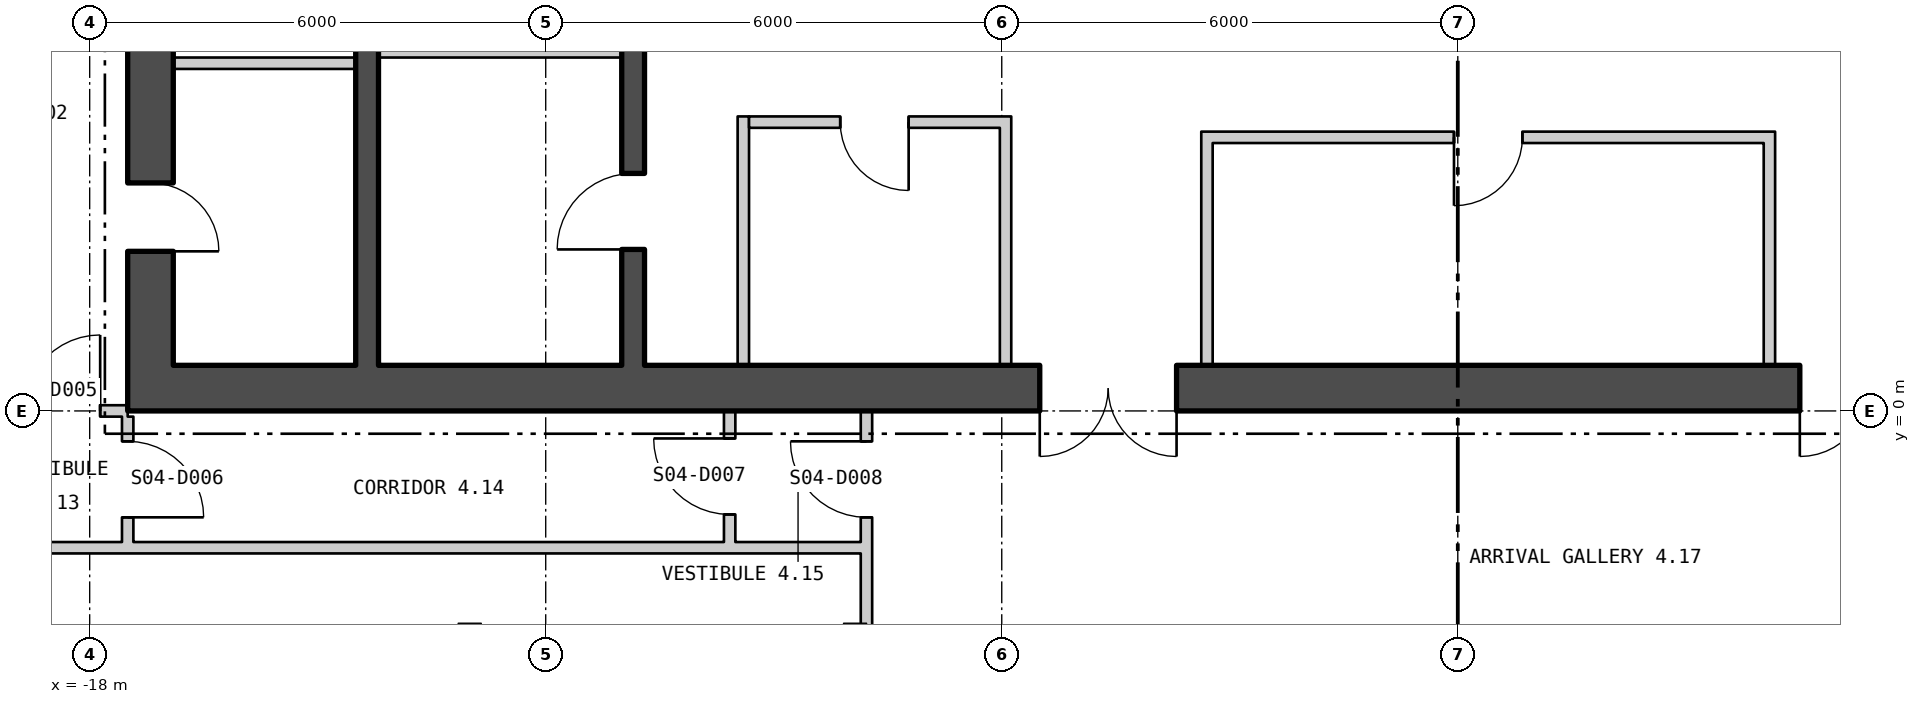
"""IFC4 building model, lengths in metres.
Left out: names, types, materials, properties, quantities, classifications, styles, units other than length and angle.
Written with IfcOpenShell. Run it as: python <this file> out.ifc"""

import sys

from ifc_helpers import new_model, si_unit, direction, frame, frame_2d, origin, origin_2d, place, context, subcontext, project, spatial, polyline, rectangle, i_section, outline, extrude, element, fill, save


model = new_model("IFC4")
c1 = context("Model", 3, precision=1e-05, world=origin(), true_north=direction((0.0, 1.0)))
c2 = subcontext(c1, "Body", "Model", "MODEL_VIEW")
j1 = project(units=[si_unit("LENGTHUNIT", "METRE"), si_unit("PLANEANGLEUNIT", "RADIAN")], contexts=[c1])
p1 = place(None, origin())
s1 = spatial("IfcSite", under=j1, at=p1, CompositionType="ELEMENT")
p2 = place(p1, origin())
s2 = spatial("IfcBuilding", under=s1, at=p2, CompositionType="ELEMENT")
p3 = place(p2, frame((0.0, 0.0, 60.3)))
s3 = spatial("IfcBuildingStorey", under=s2, at=p3, CompositionType="ELEMENT", Elevation=60.3)
for number, where, z_axis, x_axis in (
    (1, (-7.93, -3.2, 0.0), (0.0, 0.0, 1.0), (1.0, 0.0, 0.0)),
    (2, (-13.0, -3.2, 0.0), (0.0, 0.0, 1.0), (1.0, 0.0, 0.0)),
):
    element("IfcColumn", number, at=place(p3, frame(where, z_axis=z_axis, x_axis=x_axis)), inside=s3, PredefinedType="COLUMN", context=c2, shape_type="SweptSolid", body=[
        extrude(i_section(OverallWidth=0.303, OverallDepth=0.814, WebThickness=0.021, FlangeThickness=0.04, at=origin_2d()), origin(), (0.0, 0.0, 1.0), 4.5),
    ])
p4 = place(p3, frame((-28.3, 10.579, -0.18), z_axis=(0.0, 0.0, 1.0), x_axis=(0.499999388847, -0.866025756634, 0.0)))
e3 = element("IfcWall", 3, at=p4, inside=s3, PredefinedType="SOLIDWALL", context=c2, shape_type="SweptSolid", body=[
    extrude(outline(polyline([(-0.13, -0.225), (45.88, -0.225), (45.62, 0.225), (0.13, 0.225), (-0.13, -0.225)])), origin(), (0.0, 0.0, 1.0), 4.28),
])
p5 = place(p4, frame((1.425, 0.0, 1.08)))
e4 = element("IfcOpeningElement", 4, at=p5, cuts=e3, PredefinedType="OPENING", context=c2, shape_type="SweptSolid", body=[
    extrude(rectangle(XDim=2.4, YDim=2.6, at=frame_2d((1.2, 1.3))), frame((0.0, 0.235, 0.0), z_axis=(0.0, -1.0, 0.0), x_axis=(1.0, 0.0, 0.0)), (0.0, 0.0, 1.0), 0.47),
])
p6 = place(p4, frame((5.895, 0.0, 1.08)))
e5 = element("IfcOpeningElement", 5, at=p6, cuts=e3, PredefinedType="OPENING", context=c2, shape_type="SweptSolid", body=[
    extrude(rectangle(XDim=2.4, YDim=2.6, at=frame_2d((1.2, 1.3))), frame((0.0, 0.235, 0.0), z_axis=(0.0, -1.0, 0.0), x_axis=(1.0, 0.0, 0.0)), (0.0, 0.0, 1.0), 0.47),
])
p7 = place(p4, frame((10.403, 0.0, 1.08)))
e6 = element("IfcOpeningElement", 6, at=p7, cuts=e3, PredefinedType="OPENING", context=c2, shape_type="SweptSolid", body=[
    extrude(rectangle(XDim=2.4, YDim=2.6, at=frame_2d((1.2, 1.3))), frame((0.0, 0.235, 0.0), z_axis=(0.0, -1.0, 0.0), x_axis=(1.0, 0.0, 0.0)), (0.0, 0.0, 1.0), 0.47),
])
p8 = place(p4, frame((14.912, 0.0, 1.08)))
e7 = element("IfcOpeningElement", 7, at=p8, cuts=e3, PredefinedType="OPENING", context=c2, shape_type="SweptSolid", body=[
    extrude(rectangle(XDim=2.4, YDim=2.6, at=frame_2d((1.2, 1.3))), frame((0.0, 0.235, 0.0), z_axis=(0.0, -1.0, 0.0), x_axis=(1.0, 0.0, 0.0)), (0.0, 0.0, 1.0), 0.47),
])
p9 = place(p4, frame((19.421, 0.0, 1.08)))
e8 = element("IfcOpeningElement", 8, at=p9, cuts=e3, PredefinedType="OPENING", context=c2, shape_type="SweptSolid", body=[
    extrude(rectangle(XDim=2.4, YDim=2.6, at=frame_2d((1.2, 1.3))), frame((0.0, 0.235, 0.0), z_axis=(0.0, -1.0, 0.0), x_axis=(1.0, 0.0, 0.0)), (0.0, 0.0, 1.0), 0.47),
])
p10 = place(p4, frame((23.929, 0.0, 1.08)))
e9 = element("IfcOpeningElement", 9, at=p10, cuts=e3, PredefinedType="OPENING", context=c2, shape_type="SweptSolid", body=[
    extrude(rectangle(XDim=2.4, YDim=2.6, at=frame_2d((1.2, 1.3))), frame((0.0, 0.235, 0.0), z_axis=(0.0, -1.0, 0.0), x_axis=(1.0, 0.0, 0.0)), (0.0, 0.0, 1.0), 0.47),
])
p11 = place(p4, frame((28.438, 0.0, 1.08)))
e10 = element("IfcOpeningElement", 10, at=p11, cuts=e3, PredefinedType="OPENING", context=c2, shape_type="SweptSolid", body=[
    extrude(rectangle(XDim=2.4, YDim=2.6, at=frame_2d((1.2, 1.3))), frame((0.0, 0.235, 0.0), z_axis=(0.0, -1.0, 0.0), x_axis=(1.0, 0.0, 0.0)), (0.0, 0.0, 1.0), 0.47),
])
p12 = place(p4, frame((32.947, 0.0, 1.08)))
e11 = element("IfcOpeningElement", 11, at=p12, cuts=e3, PredefinedType="OPENING", context=c2, shape_type="SweptSolid", body=[
    extrude(rectangle(XDim=2.4, YDim=2.6, at=frame_2d((1.2, 1.3))), frame((0.0, 0.235, 0.0), z_axis=(0.0, -1.0, 0.0), x_axis=(1.0, 0.0, 0.0)), (0.0, 0.0, 1.0), 0.47),
])
p13 = place(p4, frame((37.455, 0.0, 1.08)))
e12 = element("IfcOpeningElement", 12, at=p13, cuts=e3, PredefinedType="OPENING", context=c2, shape_type="SweptSolid", body=[
    extrude(rectangle(XDim=2.4, YDim=2.6, at=frame_2d((1.2, 1.3))), frame((0.0, 0.235, 0.0), z_axis=(0.0, -1.0, 0.0), x_axis=(1.0, 0.0, 0.0)), (0.0, 0.0, 1.0), 0.47),
])
p14 = place(p4, frame((41.925, 0.0, 1.08)))
e13 = element("IfcOpeningElement", 13, at=p14, cuts=e3, PredefinedType="OPENING", context=c2, shape_type="SweptSolid", body=[
    extrude(rectangle(XDim=2.4, YDim=2.6, at=frame_2d((1.2, 1.3))), frame((0.0, 0.235, 0.0), z_axis=(0.0, -1.0, 0.0), x_axis=(1.0, 0.0, 0.0)), (0.0, 0.0, 1.0), 0.47),
])
p15 = place(p3, frame((-17.5, 0.3, 0.0), z_axis=(0.0, 0.0, 1.0), x_axis=(1.0, 0.0, 0.0)))
e14 = element("IfcWall", 14, at=p15, inside=s3, PredefinedType="SHEAR", context=c2, shape_type="SweptSolid", body=[
    extrude(rectangle(XDim=35.0, YDim=0.6, at=frame_2d((17.5, 0.0))), origin(), (0.0, 0.0, 1.0), 4.3),
])
p16 = place(p15, frame((12.0, 0.0, 0.0)))
e15 = element("IfcOpeningElement", 15, at=p16, cuts=e14, PredefinedType="OPENING", context=c2, shape_type="SweptSolid", body=[
    extrude(rectangle(XDim=1.8, YDim=2.4, at=frame_2d((0.9, 1.2))), frame((0.0, 0.31, 0.0), z_axis=(0.0, -1.0, 0.0), x_axis=(1.0, 0.0, 0.0)), (0.0, 0.0, 1.0), 0.62),
])
p17 = place(p15, frame((22.0, 0.0, 0.0)))
e16 = element("IfcOpeningElement", 16, at=p17, cuts=e14, PredefinedType="OPENING", context=c2, shape_type="SweptSolid", body=[
    extrude(rectangle(XDim=1.8, YDim=2.4, at=frame_2d((0.9, 1.2))), frame((0.0, 0.31, 0.0), z_axis=(0.0, -1.0, 0.0), x_axis=(1.0, 0.0, 0.0)), (0.0, 0.0, 1.0), 0.62),
])
p18 = place(p3, frame((-17.2, 0.6, 0.0), z_axis=(0.0, 0.0, 1.0), x_axis=(0.0, 1.0, 0.0)))
e17 = element("IfcWall", 17, at=p18, inside=s3, PredefinedType="SHEAR", context=c2, shape_type="SweptSolid", body=[
    extrude(rectangle(XDim=16.8, YDim=0.6, at=frame_2d((8.4, 0.0))), origin(), (0.0, 0.0, 1.0), 4.3),
])
p19 = place(p18, frame((5.7, 0.0, 0.0)))
e18 = element("IfcOpeningElement", 18, at=p19, cuts=e17, PredefinedType="OPENING", context=c2, shape_type="SweptSolid", body=[
    extrude(rectangle(XDim=1.5, YDim=2.1, at=frame_2d((0.75, 1.05))), frame((0.0, 0.31, 0.0), z_axis=(0.0, -1.0, 0.0), x_axis=(1.0, 0.0, 0.0)), (0.0, 0.0, 1.0), 0.62),
])
p20 = place(p18, frame((1.5, 0.0, 0.0)))
e19 = element("IfcOpeningElement", 19, at=p20, cuts=e17, PredefinedType="OPENING", context=c2, shape_type="SweptSolid", body=[
    extrude(rectangle(XDim=0.9, YDim=2.1, at=frame_2d((0.45, 1.05))), frame((0.0, 0.31, 0.0), z_axis=(0.0, -1.0, 0.0), x_axis=(1.0, 0.0, 0.0)), (0.0, 0.0, 1.0), 0.62),
])
p21 = place(p18, frame((4.3, 0.0, 0.0)))
e20 = element("IfcOpeningElement", 20, at=p21, cuts=e17, PredefinedType="OPENING", context=c2, shape_type="SweptSolid", body=[
    extrude(rectangle(XDim=1.0, YDim=2.1, at=frame_2d((0.5, 1.05))), frame((0.0, 0.31, 0.0), z_axis=(0.0, -1.0, 0.0), x_axis=(1.0, 0.0, 0.0)), (0.0, 0.0, 1.0), 0.62),
])
p22 = place(p18, frame((10.402, 0.0, 0.0)))
e21 = element("IfcOpeningElement", 21, at=p22, cuts=e17, PredefinedType="OPENING", context=c2, shape_type="SweptSolid", body=[
    extrude(rectangle(XDim=0.9, YDim=2.1, at=frame_2d((0.45, 1.05))), frame((0.0, 0.31, 0.0), z_axis=(0.0, -1.0, 0.0), x_axis=(1.0, 0.0, 0.0)), (0.0, 0.0, 1.0), 0.62),
])
p23 = place(p18, frame((15.202, 0.0, 0.0)))
e22 = element("IfcOpeningElement", 22, at=p23, cuts=e17, PredefinedType="OPENING", context=c2, shape_type="SweptSolid", body=[
    extrude(rectangle(XDim=0.9, YDim=2.1, at=frame_2d((0.45, 1.05))), frame((0.0, 0.31, 0.0), z_axis=(0.0, -1.0, 0.0), x_axis=(1.0, 0.0, 0.0)), (0.0, 0.0, 1.0), 0.62),
])
p24 = place(p3, frame((-10.85, 0.6, 0.0), z_axis=(0.0, 0.0, 1.0), x_axis=(0.0, 1.0, 0.0)))
e23 = element("IfcWall", 23, at=p24, inside=s3, PredefinedType="SHEAR", context=c2, shape_type="SweptSolid", body=[
    extrude(rectangle(XDim=16.8, YDim=0.3, at=frame_2d((8.4, 0.0))), origin(), (0.0, 0.0, 1.0), 4.3),
])
p25 = place(p24, frame((5.075, 0.0, 0.0)))
e24 = element("IfcOpeningElement", 24, at=p25, cuts=e23, PredefinedType="OPENING", context=c2, shape_type="SweptSolid", body=[
    extrude(rectangle(XDim=1.25, YDim=2.1, at=frame_2d((0.625, 1.05))), frame((0.0, 0.16, 0.0), z_axis=(0.0, -1.0, 0.0), x_axis=(1.0, 0.0, 0.0)), (0.0, 0.0, 1.0), 0.32),
])
p26 = place(p24, frame((1.525, 0.0, 0.0)))
e25 = element("IfcOpeningElement", 25, at=p26, cuts=e23, PredefinedType="OPENING", context=c2, shape_type="SweptSolid", body=[
    extrude(rectangle(XDim=1.0, YDim=2.1, at=frame_2d((0.5, 1.05))), frame((0.0, 0.16, 0.0), z_axis=(0.0, -1.0, 0.0), x_axis=(1.0, 0.0, 0.0)), (0.0, 0.0, 1.0), 0.32),
])
p27 = place(p3, frame((-14.35, 0.6, 0.0), z_axis=(0.0, 0.0, 1.0), x_axis=(0.0, 1.0, 0.0)))
e26 = element("IfcWall", 26, at=p27, inside=s3, PredefinedType="SHEAR", context=c2, shape_type="SweptSolid", body=[
    extrude(rectangle(XDim=16.8, YDim=0.3, at=frame_2d((8.4, 0.0))), origin(), (0.0, 0.0, 1.0), 4.3),
])
p28 = place(p27, frame((5.7, 0.0, 0.0)))
e27 = element("IfcOpeningElement", 27, at=p28, cuts=e26, PredefinedType="OPENING", context=c2, shape_type="SweptSolid", body=[
    extrude(rectangle(XDim=1.5, YDim=2.1, at=frame_2d((0.75, 1.05))), frame((0.0, 0.16, 0.0), z_axis=(0.0, -1.0, 0.0), x_axis=(1.0, 0.0, 0.0)), (0.0, 0.0, 1.0), 0.32),
])
p29 = place(p3, frame((-14.2, 4.725, 0.0), z_axis=(0.0, 0.0, 1.0), x_axis=(1.0, 0.0, 0.0)))
e28 = element("IfcWall", 28, at=p29, inside=s3, PredefinedType="PARTITIONING", context=c2, shape_type="SweptSolid", body=[
    extrude(rectangle(XDim=3.2, YDim=0.15, at=frame_2d((1.6, 0.0))), origin(), (0.0, 0.0, 1.0), 4.3),
])
p30 = place(p3, frame((-16.9, 4.575, 0.0), z_axis=(0.0, 0.0, 1.0), x_axis=(1.0, 0.0, 0.0)))
e29 = element("IfcWall", 29, at=p30, inside=s3, PredefinedType="PARTITIONING", context=c2, shape_type="SweptSolid", body=[
    extrude(rectangle(XDim=2.4, YDim=0.15, at=frame_2d((1.2, 0.0))), origin(), (0.0, 0.0, 1.0), 4.3),
])
for number, where, z_axis, x_axis in (
    (30, (-9.4, 0.6, 0.0), (0.0, 0.0, 1.0), (0.0, 1.0, 0.0)),
    (31, (-5.95, 0.6, 0.0), (0.0, 0.0, 1.0), (0.0, 1.0, 0.0)),
):
    element("IfcWall", number, at=place(p3, frame(where, z_axis=z_axis, x_axis=x_axis)), inside=s3, PredefinedType="PARTITIONING", context=c2, shape_type="SweptSolid", body=[
        extrude(rectangle(XDim=3.275, YDim=0.15, at=frame_2d((1.637, 0.0))), origin(), (0.0, 0.0, 1.0), 4.3),
    ])
p31 = place(p3, frame((-9.325, 3.8, 0.0), z_axis=(0.0, 0.0, 1.0), x_axis=(1.0, 0.0, 0.0)))
e32 = element("IfcWall", 32, at=p31, inside=s3, PredefinedType="PARTITIONING", context=c2, shape_type="SweptSolid", body=[
    extrude(rectangle(XDim=3.3, YDim=0.15, at=frame_2d((1.65, 0.0))), origin(), (0.0, 0.0, 1.0), 4.3),
])
p32 = place(p31, frame((1.2, 0.0, 0.0)))
e33 = element("IfcOpeningElement", 33, at=p32, cuts=e32, PredefinedType="OPENING", context=c2, shape_type="SweptSolid", body=[
    extrude(rectangle(XDim=0.9, YDim=2.1, at=frame_2d((0.45, 1.05))), frame((0.0, 0.085, 0.0), z_axis=(0.0, -1.0, 0.0), x_axis=(1.0, 0.0, 0.0)), (0.0, 0.0, 1.0), 0.17),
])
for number, where, z_axis, x_axis in (
    (34, (-3.3, 0.6, 0.0), (0.0, 0.0, 1.0), (0.0, 1.0, 0.0)),
    (35, (4.1, 0.6, 0.0), (0.0, 0.0, 1.0), (0.0, 1.0, 0.0)),
):
    element("IfcWall", number, at=place(p3, frame(where, z_axis=z_axis, x_axis=x_axis)), inside=s3, PredefinedType="PARTITIONING", context=c2, shape_type="SweptSolid", body=[
        extrude(rectangle(XDim=3.075, YDim=0.15, at=frame_2d((1.538, 0.0))), origin(), (0.0, 0.0, 1.0), 4.3),
    ])
p33 = place(p3, frame((-3.225, 3.6, 0.0), z_axis=(0.0, 0.0, 1.0), x_axis=(1.0, 0.0, 0.0)))
e36 = element("IfcWall", 36, at=p33, inside=s3, PredefinedType="PARTITIONING", context=c2, shape_type="SweptSolid", body=[
    extrude(rectangle(XDim=7.25, YDim=0.15, at=frame_2d((3.625, 0.0))), origin(), (0.0, 0.0, 1.0), 4.3),
])
p34 = place(p33, frame((3.175, 0.0, 0.0)))
e37 = element("IfcOpeningElement", 37, at=p34, cuts=e36, PredefinedType="OPENING", context=c2, shape_type="SweptSolid", body=[
    extrude(rectangle(XDim=0.9, YDim=2.1, at=frame_2d((0.45, 1.05))), frame((0.0, 0.085, 0.0), z_axis=(0.0, -1.0, 0.0), x_axis=(1.0, 0.0, 0.0)), (0.0, 0.0, 1.0), 0.17),
])
p35 = place(p3, frame((-19.225, -1.8, 0.0), z_axis=(0.0, 0.0, 1.0), x_axis=(1.0, 0.0, 0.0)))
e38 = element("IfcWall", 38, at=p35, inside=s3, PredefinedType="PARTITIONING", context=c2, shape_type="SweptSolid", body=[
    extrude(rectangle(XDim=11.37, YDim=0.15, at=frame_2d((5.685, 0.0))), origin(), (0.0, 0.0, 1.0), 4.3),
])
p36 = place(p3, frame((-19.225, 0.0, 0.0), z_axis=(0.0, 0.0, 1.0), x_axis=(1.0, 0.0, 0.0)))
e39 = element("IfcWall", 39, at=p36, inside=s3, PredefinedType="PARTITIONING", context=c2, shape_type="SweptSolid", body=[
    extrude(rectangle(XDim=1.725, YDim=0.15, at=frame_2d((0.863, 0.0))), origin(), (0.0, 0.0, 1.0), 3.61),
])
p37 = place(p36, frame((0.363, 0.0, 0.0)))
e40 = element("IfcOpeningElement", 40, at=p37, cuts=e39, PredefinedType="OPENING", context=c2, shape_type="SweptSolid", body=[
    extrude(rectangle(XDim=1.0, YDim=2.1, at=frame_2d((0.5, 1.05))), frame((0.0, 0.085, 0.0), z_axis=(0.0, -1.0, 0.0), x_axis=(1.0, 0.0, 0.0)), (0.0, 0.0, 1.0), 0.17),
])
p38 = place(p3, frame((-17.5, -1.725, 0.0), z_axis=(0.0, 0.0, 1.0), x_axis=(0.0, 1.0, 0.0)))
e41 = element("IfcWall", 41, at=p38, inside=s3, PredefinedType="PARTITIONING", context=c2, shape_type="SweptSolid", body=[
    extrude(rectangle(XDim=1.65, YDim=0.15, at=frame_2d((0.825, 0.0))), origin(), (0.0, 0.0, 1.0), 4.3),
])
p39 = place(p38, frame((0.325, 0.0, 0.0)))
e42 = element("IfcOpeningElement", 42, at=p39, cuts=e41, PredefinedType="OPENING", context=c2, shape_type="SweptSolid", body=[
    extrude(rectangle(XDim=1.0, YDim=2.1, at=frame_2d((0.5, 1.05))), frame((0.0, 0.085, 0.0), z_axis=(0.0, -1.0, 0.0), x_axis=(1.0, 0.0, 0.0)), (0.0, 0.0, 1.0), 0.17),
])
p40 = place(p3, frame((-9.58, -1.725, 0.0), z_axis=(0.0, 0.0, 1.0), x_axis=(0.0, 1.0, 0.0)))
e43 = element("IfcWall", 43, at=p40, inside=s3, PredefinedType="PARTITIONING", context=c2, shape_type="SweptSolid", body=[
    extrude(rectangle(XDim=1.725, YDim=0.15, at=frame_2d((0.863, 0.0))), origin(), (0.0, 0.0, 1.0), 3.7),
])
p41 = place(p40, frame((0.363, 0.0, 0.0)))
e44 = element("IfcOpeningElement", 44, at=p41, cuts=e43, PredefinedType="OPENING", context=c2, shape_type="SweptSolid", body=[
    extrude(rectangle(XDim=1.0, YDim=2.1, at=frame_2d((0.5, 1.05))), frame((0.0, 0.085, 0.0), z_axis=(0.0, -1.0, 0.0), x_axis=(1.0, 0.0, 0.0)), (0.0, 0.0, 1.0), 0.17),
])
p42 = place(p3, frame((-7.78, -3.557, 0.0), z_axis=(0.0, 0.0, 1.0), x_axis=(0.0, 1.0, 0.0)))
e45 = element("IfcWall", 45, at=p42, inside=s3, PredefinedType="PARTITIONING", context=c2, shape_type="SweptSolid", body=[
    extrude(rectangle(XDim=3.557, YDim=0.15, at=frame_2d((1.778, 0.0))), origin(), (0.0, 0.0, 1.0), 4.3),
])
p43 = place(p42, frame((2.157, 0.0, 0.0)))
e46 = element("IfcOpeningElement", 46, at=p43, cuts=e45, PredefinedType="OPENING", context=c2, shape_type="SweptSolid", body=[
    extrude(rectangle(XDim=1.0, YDim=2.1, at=frame_2d((0.5, 1.05))), frame((0.0, 0.085, 0.0), z_axis=(0.0, -1.0, 0.0), x_axis=(1.0, 0.0, 0.0)), (0.0, 0.0, 1.0), 0.17),
])
p44 = place(p26, origin())
e47 = element("IfcDoor", 47, at=p44, inside=s3, OperationType="SINGLE_SWING_RIGHT", PredefinedType="DOOR", context=c2, shape_type="SweptSolid", body=[
    extrude(rectangle(XDim=1.0, YDim=2.1, at=frame_2d((0.5, 1.05))), frame((0.0, 0.025, 0.0), z_axis=(0.0, -1.0, 0.0), x_axis=(1.0, 0.0, 0.0)), (0.0, 0.0, 1.0), 0.05),
])
fill(e25, e47)
p45 = place(p20, origin())
e48 = element("IfcDoor", 48, at=p45, inside=s3, OperationType="SINGLE_SWING_LEFT", PredefinedType="DOOR", context=c2, shape_type="SweptSolid", body=[
    extrude(rectangle(XDim=0.9, YDim=2.1, at=frame_2d((0.45, 1.05))), frame((0.0, 0.025, 0.0), z_axis=(0.0, -1.0, 0.0), x_axis=(1.0, 0.0, 0.0)), (0.0, 0.0, 1.0), 0.05),
])
fill(e19, e48)
p46 = place(p32, origin())
e49 = element("IfcDoor", 49, at=p46, inside=s3, OperationType="SINGLE_SWING_RIGHT", PredefinedType="DOOR", context=c2, shape_type="SweptSolid", body=[
    extrude(rectangle(XDim=0.9, YDim=2.1, at=frame_2d((0.45, 1.05))), frame((0.0, 0.025, 0.0), z_axis=(0.0, -1.0, 0.0), x_axis=(1.0, 0.0, 0.0)), (0.0, 0.0, 1.0), 0.05),
])
fill(e33, e49)
p47 = place(p34, origin())
e50 = element("IfcDoor", 50, at=p47, inside=s3, OperationType="SINGLE_SWING_LEFT", PredefinedType="DOOR", context=c2, shape_type="SweptSolid", body=[
    extrude(rectangle(XDim=0.9, YDim=2.1, at=frame_2d((0.45, 1.05))), frame((0.0, 0.025, 0.0), z_axis=(0.0, -1.0, 0.0), x_axis=(1.0, 0.0, 0.0)), (0.0, 0.0, 1.0), 0.05),
])
fill(e37, e50)
p48 = place(p16, origin())
e51 = element("IfcDoor", 51, at=p48, inside=s3, OperationType="DOUBLE_DOOR_SINGLE_SWING", PredefinedType="DOOR", context=c2, shape_type="SweptSolid", body=[
    extrude(rectangle(XDim=1.8, YDim=2.4, at=frame_2d((0.9, 1.2))), frame((0.0, 0.025, 0.0), z_axis=(0.0, -1.0, 0.0), x_axis=(1.0, 0.0, 0.0)), (0.0, 0.0, 1.0), 0.05),
])
fill(e15, e51)
p49 = place(p17, origin())
e52 = element("IfcDoor", 52, at=p49, inside=s3, OperationType="DOUBLE_DOOR_SINGLE_SWING", PredefinedType="DOOR", context=c2, shape_type="SweptSolid", body=[
    extrude(rectangle(XDim=1.8, YDim=2.4, at=frame_2d((0.9, 1.2))), frame((0.0, 0.025, 0.0), z_axis=(0.0, -1.0, 0.0), x_axis=(1.0, 0.0, 0.0)), (0.0, 0.0, 1.0), 0.05),
])
fill(e16, e52)
p50 = place(p37, origin())
e53 = element("IfcDoor", 53, at=p50, inside=s3, OperationType="SINGLE_SWING_LEFT", PredefinedType="DOOR", context=c2, shape_type="SweptSolid", body=[
    extrude(rectangle(XDim=1.0, YDim=2.1, at=frame_2d((0.5, 1.05))), frame((0.0, 0.025, 0.0), z_axis=(0.0, -1.0, 0.0), x_axis=(1.0, 0.0, 0.0)), (0.0, 0.0, 1.0), 0.05),
])
fill(e40, e53)
p51 = place(p39, origin())
e54 = element("IfcDoor", 54, at=p51, inside=s3, OperationType="SINGLE_SWING_LEFT", PredefinedType="DOOR", context=c2, shape_type="SweptSolid", body=[
    extrude(rectangle(XDim=1.0, YDim=2.1, at=frame_2d((0.5, 1.05))), frame((0.0, 0.025, 0.0), z_axis=(0.0, -1.0, 0.0), x_axis=(1.0, 0.0, 0.0)), (0.0, 0.0, 1.0), 0.05),
])
fill(e42, e54)
p52 = place(p41, origin())
e55 = element("IfcDoor", 55, at=p52, inside=s3, OperationType="SINGLE_SWING_LEFT", PredefinedType="DOOR", context=c2, shape_type="SweptSolid", body=[
    extrude(rectangle(XDim=1.0, YDim=2.1, at=frame_2d((0.5, 1.05))), frame((0.0, 0.025, 0.0), z_axis=(0.0, -1.0, 0.0), x_axis=(1.0, 0.0, 0.0)), (0.0, 0.0, 1.0), 0.05),
])
fill(e44, e55)
p53 = place(p43, origin())
e56 = element("IfcDoor", 56, at=p53, inside=s3, OperationType="SINGLE_SWING_LEFT", PredefinedType="DOOR", context=c2, shape_type="SweptSolid", body=[
    extrude(rectangle(XDim=1.0, YDim=2.1, at=frame_2d((0.5, 1.05))), frame((0.0, 0.025, 0.0), z_axis=(0.0, -1.0, 0.0), x_axis=(1.0, 0.0, 0.0)), (0.0, 0.0, 1.0), 0.05),
])
fill(e46, e56)
save(model, sys.argv[1])
